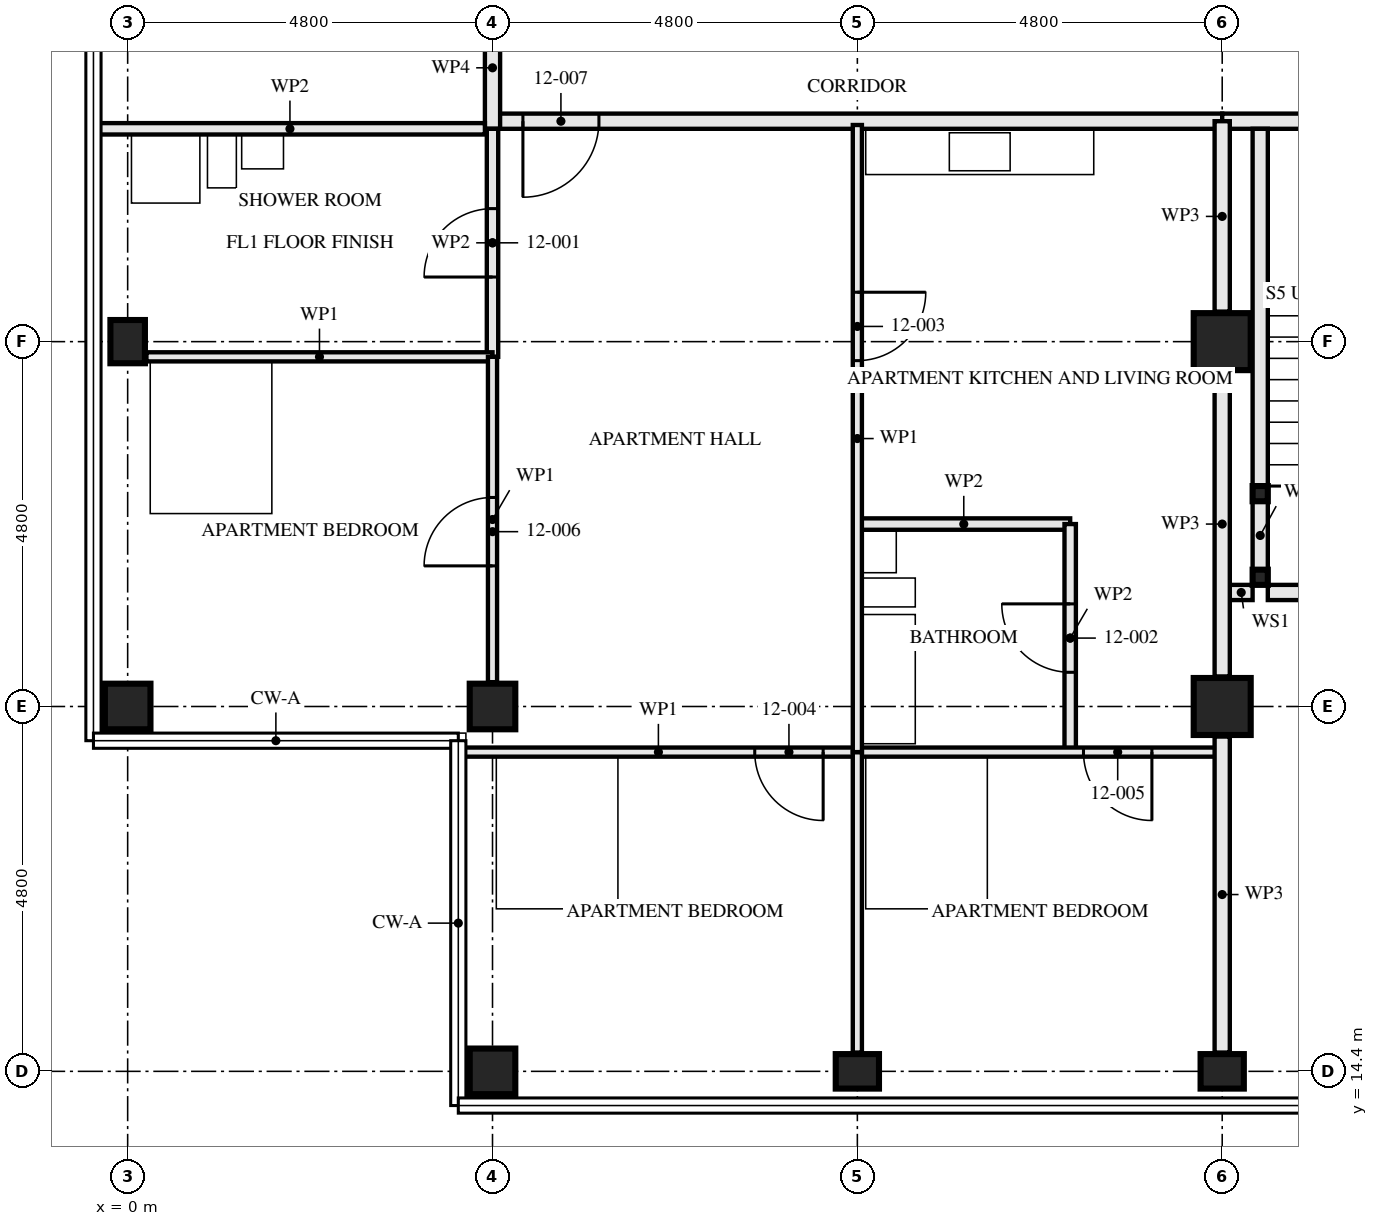
"""IFC4 building model, lengths in metres.
Left out: names, types, materials, properties, quantities, classifications, styles, units other than length and angle.
Written with IfcOpenShell. Run it as: python <this file> out.ifc"""

import sys

from ifc_helpers import new_model, si_unit, direction, frame, frame_2d, origin, origin_2d, place, context, subcontext, project, spatial, rectangle, hollow_rectangle, i_section, extrude, element, fill, save


model = new_model("IFC4")
c1 = context("Model", 3, precision=1e-05, world=origin(), true_north=direction((0.0, 1.0)))
c2 = subcontext(c1, "Body", "Model", "MODEL_VIEW")
j1 = project(units=[si_unit("LENGTHUNIT", "METRE"), si_unit("PLANEANGLEUNIT", "RADIAN")], contexts=[c1])
p1 = place(None, origin())
s1 = spatial("IfcSite", under=j1, at=p1, CompositionType="ELEMENT")
p2 = place(p1, origin())
s2 = spatial("IfcBuilding", under=s1, at=p2, CompositionType="ELEMENT")
p3 = place(p2, frame((0.0, 0.0, 48.0)))
s3 = spatial("IfcBuildingStorey", under=s2, at=p3, CompositionType="ELEMENT", Elevation=48.0)
p4 = place(p3, frame((0.0, 19.2, 0.0), z_axis=(0.0, 0.0, 1.0), x_axis=(0.0, 1.0, 0.0)))
e1 = element("IfcColumn", 1, at=p4, inside=s3, PredefinedType="COLUMN", context=c2, shape_type="SweptSolid", body=[
    extrude(hollow_rectangle(XDim=0.6, YDim=0.6, WallThickness=0.05, at=origin_2d()), origin(), (0.0, 0.0, 1.0), 3.5),
])
p5 = place(p3, frame((0.0, 24.0, 0.0), z_axis=(0.0, 0.0, 1.0), x_axis=(1.0, 0.0, 0.0)))
e2 = element("IfcColumn", 2, at=p5, inside=s3, PredefinedType="COLUMN", context=c2, shape_type="SweptSolid", body=[
    extrude(i_section(OverallWidth=0.454, OverallDepth=0.569, WebThickness=0.078, FlangeThickness=0.125, FilletRadius=0.015, at=origin_2d()), origin(), (0.0, 0.0, 1.0), 3.5),
])
for number, where, z_axis, x_axis in (
    (3, (4.8, 14.4, 0.0), (0.0, 0.0, 1.0), (0.0, 1.0, 0.0)),
    (4, (4.8, 19.2, 0.0), (0.0, 0.0, 1.0), (0.0, 1.0, 0.0)),
):
    element("IfcColumn", number, at=place(p3, frame(where, z_axis=z_axis, x_axis=x_axis)), inside=s3, PredefinedType="COLUMN", context=c2, shape_type="SweptSolid", body=[
        extrude(hollow_rectangle(XDim=0.6, YDim=0.6, WallThickness=0.05, at=origin_2d()), origin(), (0.0, 0.0, 1.0), 3.5),
    ])
for number, where, z_axis, x_axis in (
    (5, (9.6, 14.4, 0.0), (0.0, 0.0, 1.0), (0.0, 1.0, 0.0)),
    (6, (14.4, 14.4, 0.0), (0.0, 0.0, 1.0), (0.0, 1.0, 0.0)),
):
    element("IfcColumn", number, at=place(p3, frame(where, z_axis=z_axis, x_axis=x_axis)), inside=s3, PredefinedType="COLUMN", context=c2, shape_type="SweptSolid", body=[
        extrude(i_section(OverallWidth=0.454, OverallDepth=0.569, WebThickness=0.078, FlangeThickness=0.125, FilletRadius=0.015, at=origin_2d()), origin(), (0.0, 0.0, 1.0), 3.5),
    ])
for number, where, z_axis, x_axis in (
    (7, (14.4, 19.2, 0.0), (0.0, 0.0, 1.0), (1.0, 0.0, 0.0)),
    (8, (14.4, 24.0, 0.0), (0.0, 0.0, 1.0), (1.0, 0.0, 0.0)),
):
    element("IfcColumn", number, at=place(p3, frame(where, z_axis=z_axis, x_axis=x_axis)), inside=s3, PredefinedType="COLUMN", context=c2, shape_type="SweptSolid", body=[
        extrude(hollow_rectangle(XDim=0.75, YDim=0.75, WallThickness=0.08, at=origin_2d()), origin(), (0.0, 0.0, 1.0), 3.5),
    ])
for number, where, z_axis, x_axis in (
    (9, (14.9, 20.9, 0.0), (0.0, 0.0, 1.0), (1.0, 0.0, 0.0)),
    (10, (14.9, 22.0, 0.0), (0.0, 0.0, 1.0), (1.0, 0.0, 0.0)),
):
    element("IfcColumn", number, at=place(p3, frame(where, z_axis=z_axis, x_axis=x_axis)), inside=s3, PredefinedType="COLUMN", context=c2, shape_type="SweptSolid", body=[
        extrude(hollow_rectangle(XDim=0.2, YDim=0.2, WallThickness=0.008, at=origin_2d()), origin(), (0.0, 0.0, 1.0), 3.33),
    ])
p6 = place(p3, frame((4.8, 23.8, 0.0), z_axis=(0.0, 0.0, 1.0), x_axis=(0.0, 1.0, 0.0)))
e11 = element("IfcWall", 11, at=p6, inside=s3, PredefinedType="PARTITIONING", context=c2, shape_type="SweptSolid", body=[
    extrude(rectangle(XDim=3.0, YDim=0.15, at=frame_2d((1.5, 0.0))), origin(), (0.0, 0.0, 1.0), 2.55),
])
p7 = place(p6, frame((1.05, 0.0, 0.0)))
e12 = element("IfcOpeningElement", 12, at=p7, cuts=e11, PredefinedType="OPENING", context=c2, shape_type="SweptSolid", body=[
    extrude(rectangle(XDim=0.9, YDim=2.1, at=frame_2d((0.45, 1.05))), frame((0.0, 0.085, 0.0), z_axis=(0.0, -1.0, 0.0), x_axis=(1.0, 0.0, 0.0)), (0.0, 0.0, 1.0), 0.171),
])
p8 = place(p3, frame((12.4, 18.6, 0.0), z_axis=(0.0, 0.0, 1.0), x_axis=(0.0, 1.0, 0.0)))
e13 = element("IfcWall", 13, at=p8, inside=s3, PredefinedType="PARTITIONING", context=c2, shape_type="SweptSolid", body=[
    extrude(rectangle(XDim=3.0, YDim=0.15, at=frame_2d((1.5, 0.0))), origin(), (0.0, 0.0, 1.0), 2.55),
])
p9 = place(p8, frame((1.05, 0.0, 0.0)))
e14 = element("IfcOpeningElement", 14, at=p9, cuts=e13, PredefinedType="OPENING", context=c2, shape_type="SweptSolid", body=[
    extrude(rectangle(XDim=0.9, YDim=2.1, at=frame_2d((0.45, 1.05))), frame((0.0, 0.085, 0.0), z_axis=(0.0, -1.0, 0.0), x_axis=(1.0, 0.0, 0.0)), (0.0, 0.0, 1.0), 0.171),
])
p10 = place(p3, frame((9.6, 21.6, 0.0), z_axis=(0.0, 0.0, 1.0), x_axis=(1.0, 0.0, 0.0)))
e15 = element("IfcWall", 15, at=p10, inside=s3, PredefinedType="PARTITIONING", context=c2, shape_type="SweptSolid", body=[
    extrude(rectangle(XDim=2.8, YDim=0.15, at=frame_2d((1.4, 0.0))), origin(), (0.0, 0.0, 1.0), 3.33),
])
p11 = place(p3, frame((9.6, 18.6, 0.0), z_axis=(0.0, 0.0, 1.0), x_axis=(0.0, 1.0, 0.0)))
e16 = element("IfcWall", 16, at=p11, inside=s3, PredefinedType="PARTITIONING", context=c2, shape_type="SweptSolid", body=[
    extrude(rectangle(XDim=8.25, YDim=0.12, at=frame_2d((4.125, 0.0))), origin(), (0.0, 0.0, 1.0), 2.55),
])
p12 = place(p11, frame((5.15, 0.0, 0.0)))
e17 = element("IfcOpeningElement", 17, at=p12, cuts=e16, PredefinedType="OPENING", context=c2, shape_type="SweptSolid", body=[
    extrude(rectangle(XDim=0.9, YDim=2.1, at=frame_2d((0.45, 1.05))), frame((0.0, 0.071, 0.0), z_axis=(0.0, -1.0, 0.0), x_axis=(1.0, 0.0, 0.0)), (0.0, 0.0, 1.0), 0.141),
])
p13 = place(p3, frame((0.247, 23.8, 0.0), z_axis=(0.0, 0.0, 1.0), x_axis=(1.0, 0.0, 0.0)))
e18 = element("IfcWall", 18, at=p13, inside=s3, PredefinedType="PARTITIONING", context=c2, shape_type="SweptSolid", body=[
    extrude(rectangle(XDim=4.553, YDim=0.12, at=frame_2d((2.276, 0.0))), origin(), (0.0, 0.0, 1.0), 3.33),
])
p14 = place(p3, frame((4.365, 18.6, 0.0), z_axis=(0.0, 0.0, 1.0), x_axis=(1.0, 0.0, 0.0)))
e19 = element("IfcWall", 19, at=p14, inside=s3, PredefinedType="PARTITIONING", context=c2, shape_type="SweptSolid", body=[
    extrude(rectangle(XDim=5.235, YDim=0.12, at=frame_2d((2.618, 0.0))), origin(), (0.0, 0.0, 1.0), 2.32),
])
p15 = place(p14, frame((3.885, 0.0, 0.0)))
e20 = element("IfcOpeningElement", 20, at=p15, cuts=e19, PredefinedType="OPENING", context=c2, shape_type="SweptSolid", body=[
    extrude(rectangle(XDim=0.9, YDim=2.1, at=frame_2d((0.45, 1.05))), frame((0.0, 0.071, 0.0), z_axis=(0.0, -1.0, 0.0), x_axis=(1.0, 0.0, 0.0)), (0.0, 0.0, 1.0), 0.141),
])
p16 = place(p3, frame((9.6, 18.6, 0.0), z_axis=(0.0, 0.0, 1.0), x_axis=(1.0, 0.0, 0.0)))
e21 = element("IfcWall", 21, at=p16, inside=s3, PredefinedType="PARTITIONING", context=c2, shape_type="SweptSolid", body=[
    extrude(rectangle(XDim=4.8, YDim=0.12, at=frame_2d((2.4, 0.0))), origin(), (0.0, 0.0, 1.0), 3.33),
])
p17 = place(p16, frame((2.975, 0.0, 0.0)))
e22 = element("IfcOpeningElement", 22, at=p17, cuts=e21, PredefinedType="OPENING", context=c2, shape_type="SweptSolid", body=[
    extrude(rectangle(XDim=0.9, YDim=2.1, at=frame_2d((0.45, 1.05))), frame((0.0, 0.071, 0.0), z_axis=(0.0, -1.0, 0.0), x_axis=(1.0, 0.0, 0.0)), (0.0, 0.0, 1.0), 0.141),
])
p18 = place(p3, frame((4.8, 19.52, 0.0), z_axis=(0.0, 0.0, 1.0), x_axis=(0.0, 1.0, 0.0)))
e23 = element("IfcWall", 23, at=p18, inside=s3, PredefinedType="PARTITIONING", context=c2, shape_type="SweptSolid", body=[
    extrude(rectangle(XDim=4.28, YDim=0.12, at=frame_2d((2.14, 0.0))), origin(), (0.0, 0.0, 1.0), 3.33),
])
p19 = place(p18, frame((1.53, 0.0, 0.0)))
e24 = element("IfcOpeningElement", 24, at=p19, cuts=e23, PredefinedType="OPENING", context=c2, shape_type="SweptSolid", body=[
    extrude(rectangle(XDim=0.9, YDim=2.1, at=frame_2d((0.45, 1.05))), frame((0.0, 0.071, 0.0), z_axis=(0.0, -1.0, 0.0), x_axis=(1.0, 0.0, 0.0)), (0.0, 0.0, 1.0), 0.141),
])
p20 = place(p3, frame((9.6, 14.647, 0.0), z_axis=(0.0, 0.0, 1.0), x_axis=(0.0, 1.0, 0.0)))
e25 = element("IfcWall", 25, at=p20, inside=s3, PredefinedType="PARTITIONING", context=c2, shape_type="SweptSolid", body=[
    extrude(rectangle(XDim=3.953, YDim=0.12, at=frame_2d((1.977, 0.0))), origin(), (0.0, 0.0, 1.0), 3.33),
])
p21 = place(p3, frame((4.8, 26.9, 0.0), z_axis=(0.0, 0.0, 1.0), x_axis=(1.0, 0.0, 0.0)))
e26 = element("IfcWall", 26, at=p21, inside=s3, PredefinedType="PARTITIONING", context=c2, shape_type="SweptSolid", body=[
    extrude(rectangle(XDim=9.6, YDim=0.2, at=frame_2d((4.8, 0.0))), origin(), (0.0, 0.0, 1.0), 3.33),
])
p22 = place(p21, frame((0.4, 0.0, 0.0)))
e27 = element("IfcOpeningElement", 27, at=p22, cuts=e26, PredefinedType="OPENING", context=c2, shape_type="SweptSolid", body=[
    extrude(rectangle(XDim=1.0, YDim=2.1, at=frame_2d((0.5, 1.05))), frame((0.0, 0.111, 0.0), z_axis=(0.0, -1.0, 0.0), x_axis=(1.0, 0.0, 0.0)), (0.0, 0.0, 1.0), 0.221),
])
p23 = place(p3, frame((4.8, 26.8, 0.0), z_axis=(0.0, 0.0, 1.0), x_axis=(0.0, 1.0, 0.0)))
e28 = element("IfcWall", 28, at=p23, inside=s3, PredefinedType="PARTITIONING", context=c2, shape_type="SweptSolid", body=[
    extrude(rectangle(XDim=1.605, YDim=0.2, at=frame_2d((0.802, 0.0))), origin(), (0.0, 0.0, 1.0), 3.33),
])
p24 = place(p3, frame((14.9, 21.0, 0.0), z_axis=(0.0, 0.0, 1.0), x_axis=(0.0, 1.0, 0.0)))
e29 = element("IfcWall", 29, at=p24, inside=s3, PredefinedType="SOLIDWALL", context=c2, shape_type="SweptSolid", body=[
    extrude(rectangle(XDim=0.9, YDim=0.2, at=frame_2d((0.45, 0.0))), origin(), (0.0, 0.0, 1.0), 2.99),
])
p25 = place(p3, frame((14.9, 22.1, 0.0), z_axis=(0.0, 0.0, 1.0), x_axis=(0.0, 1.0, 0.0)))
e30 = element("IfcWall", 30, at=p25, inside=s3, PredefinedType="SOLIDWALL", context=c2, shape_type="SweptSolid", body=[
    extrude(rectangle(XDim=4.7, YDim=0.2, at=frame_2d((2.35, 0.0))), origin(), (0.0, 0.0, 1.0), 2.99),
])
p26 = place(p3, frame((14.5, 20.7, 0.0), z_axis=(0.0, 0.0, 1.0), x_axis=(1.0, 0.0, 0.0)))
e31 = element("IfcWall", 31, at=p26, inside=s3, PredefinedType="SOLIDWALL", context=c2, shape_type="SweptSolid", body=[
    extrude(rectangle(XDim=0.3, YDim=0.2, at=frame_2d((0.15, 0.0))), origin(), (0.0, 0.0, 1.0), 3.33),
])
p27 = place(p3, frame((15.0, 20.7, 0.0), z_axis=(0.0, 0.0, 1.0), x_axis=(1.0, 0.0, 0.0)))
e32 = element("IfcWall", 32, at=p27, inside=s3, PredefinedType="SOLIDWALL", context=c2, shape_type="SweptSolid", body=[
    extrude(rectangle(XDim=2.6, YDim=0.2, at=frame_2d((1.3, 0.0))), origin(), (0.0, 0.0, 1.0), 3.33),
])
p28 = place(p3, frame((14.4, 26.9, 0.0), z_axis=(0.0, 0.0, 1.0), x_axis=(1.0, 0.0, 0.0)))
e33 = element("IfcWall", 33, at=p28, inside=s3, PredefinedType="PARTITIONING", context=c2, shape_type="SweptSolid", body=[
    extrude(rectangle(XDim=14.4, YDim=0.2, at=frame_2d((7.2, 0.0))), origin(), (0.0, 0.0, 1.0), 2.55),
])
p29 = place(p28, frame((1.4, 0.0, 0.0)))
e34 = element("IfcOpeningElement", 34, at=p29, cuts=e33, PredefinedType="OPENING", context=c2, shape_type="SweptSolid", body=[
    extrude(rectangle(XDim=1.0, YDim=2.1, at=frame_2d((0.5, 1.05))), frame((0.0, 0.111, 0.0), z_axis=(0.0, -1.0, 0.0), x_axis=(1.0, 0.0, 0.0)), (0.0, 0.0, 1.0), 0.221),
])
p30 = place(p28, frame((3.65, 0.0, 0.0)))
e35 = element("IfcOpeningElement", 35, at=p30, cuts=e33, PredefinedType="OPENING", context=c2, shape_type="SweptSolid", body=[
    extrude(rectangle(XDim=0.9, YDim=2.1, at=frame_2d((0.45, 1.05))), frame((0.0, 0.111, 0.0), z_axis=(0.0, -1.0, 0.0), x_axis=(1.0, 0.0, 0.0)), (0.0, 0.0, 1.0), 0.221),
])
p31 = place(p28, frame((5.2, 0.0, 0.0)))
e36 = element("IfcOpeningElement", 36, at=p31, cuts=e33, PredefinedType="OPENING", context=c2, shape_type="SweptSolid", body=[
    extrude(rectangle(XDim=1.0, YDim=2.1, at=frame_2d((0.5, 1.05))), frame((0.0, 0.111, 0.0), z_axis=(0.0, -1.0, 0.0), x_axis=(1.0, 0.0, 0.0)), (0.0, 0.0, 1.0), 0.221),
])
p32 = place(p28, frame((10.0, 0.0, 0.0)))
e37 = element("IfcOpeningElement", 37, at=p32, cuts=e33, PredefinedType="OPENING", context=c2, shape_type="SweptSolid", body=[
    extrude(rectangle(XDim=1.0, YDim=2.1, at=frame_2d((0.5, 1.05))), frame((0.0, 0.111, 0.0), z_axis=(0.0, -1.0, 0.0), x_axis=(1.0, 0.0, 0.0)), (0.0, 0.0, 1.0), 0.221),
])
p33 = place(p3, frame((14.4, 14.647, 0.0), z_axis=(0.0, 0.0, 1.0), x_axis=(0.0, 1.0, 0.0)))
e38 = element("IfcWall", 38, at=p33, inside=s3, PredefinedType="PARTITIONING", context=c2, shape_type="SweptSolid", body=[
    extrude(rectangle(XDim=4.158, YDim=0.2, at=frame_2d((2.079, 0.0))), origin(), (0.0, 0.0, 1.0), 2.32),
])
p34 = place(p3, frame((14.4, 19.595, 0.0), z_axis=(0.0, 0.0, 1.0), x_axis=(0.0, 1.0, 0.0)))
e39 = element("IfcWall", 39, at=p34, inside=s3, PredefinedType="PARTITIONING", context=c2, shape_type="SweptSolid", body=[
    extrude(rectangle(XDim=4.01, YDim=0.2, at=frame_2d((2.005, 0.0))), origin(), (0.0, 0.0, 1.0), 2.32),
])
p35 = place(p3, frame((14.4, 24.395, 0.0), z_axis=(0.0, 0.0, 1.0), x_axis=(0.0, 1.0, 0.0)))
e40 = element("IfcWall", 40, at=p35, inside=s3, PredefinedType="PARTITIONING", context=c2, shape_type="SweptSolid", body=[
    extrude(rectangle(XDim=2.505, YDim=0.2, at=frame_2d((1.252, 0.0))), origin(), (0.0, 0.0, 1.0), 2.32),
])
p36 = place(p3, frame((-0.43, 26.8, 0.0), z_axis=(0.0, 0.0, 1.0), x_axis=(1.0, 0.0, 0.0)))
e41 = element("IfcWall", 41, at=p36, inside=s3, PredefinedType="PARTITIONING", context=c2, shape_type="SweptSolid", body=[
    extrude(rectangle(XDim=5.13, YDim=0.15, at=frame_2d((2.565, 0.0))), origin(), (0.0, 0.0, 1.0), 2.32),
])
p37 = place(p7, origin())
e42 = element("IfcDoor", 42, at=p37, inside=s3, OperationType="SINGLE_SWING_RIGHT", PredefinedType="DOOR", context=c2, shape_type="SweptSolid", body=[
    extrude(rectangle(XDim=0.9, YDim=2.1, at=frame_2d((0.45, 1.05))), frame((0.0, 0.022, 0.0), z_axis=(0.0, -1.0, 0.0), x_axis=(1.0, 0.0, 0.0)), (0.0, 0.0, 1.0), 0.044),
])
fill(e12, e42)
p38 = place(p9, origin())
e43 = element("IfcDoor", 43, at=p38, inside=s3, OperationType="SINGLE_SWING_LEFT", PredefinedType="DOOR", context=c2, shape_type="SweptSolid", body=[
    extrude(rectangle(XDim=0.9, YDim=2.1, at=frame_2d((0.45, 1.05))), frame((0.0, 0.022, 0.0), z_axis=(0.0, -1.0, 0.0), x_axis=(1.0, 0.0, 0.0)), (0.0, 0.0, 1.0), 0.044),
])
fill(e14, e43)
p39 = place(p12, frame((0.9, 0.0, 0.0), z_axis=(0.0, 0.0, 1.0), x_axis=(-1.0, 0.0, 0.0)))
e44 = element("IfcDoor", 44, at=p39, inside=s3, OperationType="SINGLE_SWING_RIGHT", PredefinedType="DOOR", context=c2, shape_type="SweptSolid", body=[
    extrude(rectangle(XDim=0.9, YDim=2.1, at=frame_2d((0.45, 1.05))), frame((0.0, 0.022, 0.0), z_axis=(0.0, -1.0, 0.0), x_axis=(1.0, 0.0, 0.0)), (0.0, 0.0, 1.0), 0.044),
])
fill(e17, e44)
p40 = place(p15, frame((0.9, 0.0, 0.0), z_axis=(0.0, 0.0, 1.0), x_axis=(-1.0, 0.0, 0.0)))
e45 = element("IfcDoor", 45, at=p40, inside=s3, OperationType="SINGLE_SWING_RIGHT", PredefinedType="DOOR", context=c2, shape_type="SweptSolid", body=[
    extrude(rectangle(XDim=0.9, YDim=2.1, at=frame_2d((0.45, 1.05))), frame((0.0, 0.022, 0.0), z_axis=(0.0, -1.0, 0.0), x_axis=(1.0, 0.0, 0.0)), (0.0, 0.0, 1.0), 0.044),
])
fill(e20, e45)
p41 = place(p17, frame((0.9, 0.0, 0.0), z_axis=(0.0, 0.0, 1.0), x_axis=(-1.0, 0.0, 0.0)))
e46 = element("IfcDoor", 46, at=p41, inside=s3, OperationType="SINGLE_SWING_RIGHT", PredefinedType="DOOR", context=c2, shape_type="SweptSolid", body=[
    extrude(rectangle(XDim=0.9, YDim=2.1, at=frame_2d((0.45, 1.05))), frame((0.0, 0.022, 0.0), z_axis=(0.0, -1.0, 0.0), x_axis=(1.0, 0.0, 0.0)), (0.0, 0.0, 1.0), 0.044),
])
fill(e22, e46)
p42 = place(p19, origin())
e47 = element("IfcDoor", 47, at=p42, inside=s3, OperationType="SINGLE_SWING_RIGHT", PredefinedType="DOOR", context=c2, shape_type="SweptSolid", body=[
    extrude(rectangle(XDim=0.9, YDim=2.1, at=frame_2d((0.45, 1.05))), frame((0.0, 0.022, 0.0), z_axis=(0.0, -1.0, 0.0), x_axis=(1.0, 0.0, 0.0)), (0.0, 0.0, 1.0), 0.044),
])
fill(e24, e47)
p43 = place(p22, frame((1.0, 0.0, 0.0), z_axis=(0.0, 0.0, 1.0), x_axis=(-1.0, 0.0, 0.0)))
e48 = element("IfcDoor", 48, at=p43, inside=s3, OperationType="SINGLE_SWING_LEFT", PredefinedType="DOOR", context=c2, shape_type="SweptSolid", body=[
    extrude(rectangle(XDim=1.0, YDim=2.1, at=frame_2d((0.5, 1.05))), frame((0.0, 0.027, 0.0), z_axis=(0.0, -1.0, 0.0), x_axis=(1.0, 0.0, 0.0)), (0.0, 0.0, 1.0), 0.054),
])
fill(e27, e48)
save(model, sys.argv[1])
